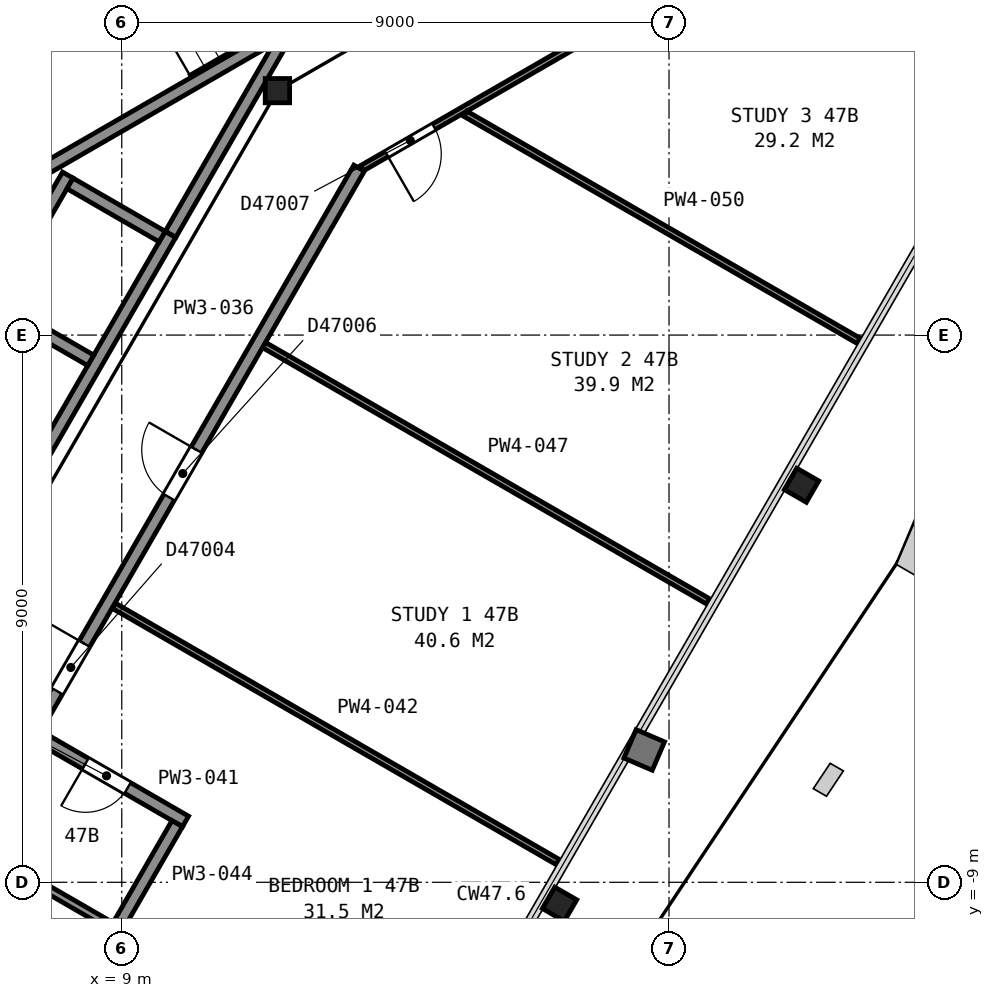
"""IFC4 building model, lengths in metres.
Left out: names, types, materials, properties, quantities, classifications, styles, units other than length and angle.
Written with IfcOpenShell. Run it as: python <this file> out.ifc"""

import sys

from ifc_helpers import new_model, si_unit, direction, frame, frame_2d, origin, origin_2d, place, context, subcontext, project, spatial, rectangle, i_section, extrude, element, fill, save


model = new_model("IFC4")
c1 = context("Model", 3, precision=1e-05, world=origin(), true_north=direction((0.0, 1.0)))
c2 = subcontext(c1, "Body", "Model", "MODEL_VIEW")
j1 = project(units=[si_unit("LENGTHUNIT", "METRE"), si_unit("PLANEANGLEUNIT", "RADIAN")], contexts=[c1])
p1 = place(None, origin())
s1 = spatial("IfcSite", under=j1, at=p1, CompositionType="ELEMENT")
p2 = place(p1, origin())
s2 = spatial("IfcBuilding", under=s1, at=p2, CompositionType="ELEMENT")
p3 = place(p2, frame((0.0, 0.0, 189.5)))
s3 = spatial("IfcBuildingStorey", under=s2, at=p3, CompositionType="ELEMENT", Elevation=189.5)
p4 = place(p3, frame((16.2, -9.36, 0.03), z_axis=(0.0, 0.0, 1.0), x_axis=(-0.5, -0.866025403784, 0.0)))
e1 = element("IfcColumn", 1, at=p4, inside=s3, PredefinedType="COLUMN", context=c2, shape_type="SweptSolid", body=[
    extrude(i_section(OverallWidth=0.406, OverallDepth=0.417, WebThickness=0.03, FlangeThickness=0.048, FilletRadius=0.015, at=origin_2d()), origin(), (0.0, 0.0, 1.0), 3.67),
])
p5 = place(p3, frame((20.18, -2.47, 0.035), z_axis=(0.0, 0.0, 1.0), x_axis=(-0.5, -0.866025403784, 0.0)))
e2 = element("IfcColumn", 2, at=p5, inside=s3, PredefinedType="COLUMN", context=c2, shape_type="SweptSolid", body=[
    extrude(i_section(OverallWidth=0.406, OverallDepth=0.417, WebThickness=0.03, FlangeThickness=0.048, FilletRadius=0.015, at=origin_2d()), origin(), (0.0, 0.0, 1.0), 3.665),
])
p6 = place(p3, frame((11.56, 4.02, 0.0), z_axis=(0.0, 0.0, 1.0), x_axis=(1.0, 0.0, 0.0)))
e3 = element("IfcColumn", 3, at=p6, inside=s3, PredefinedType="COLUMN", context=c2, shape_type="SweptSolid", body=[
    extrude(i_section(OverallWidth=0.401, OverallDepth=0.399, WebThickness=0.025, FlangeThickness=0.04, FilletRadius=0.015, at=origin_2d()), origin(), (0.0, 0.0, 1.0), 3.7),
])
p7 = place(p3, frame((7.678, 2.701, 0.0), z_axis=(0.0, 0.0, 1.0), x_axis=(0.866019993635, 0.500009370536, 0.0)))
e4 = element("IfcWall", 4, at=p7, inside=s3, PredefinedType="PARTITIONING", context=c2, shape_type="SweptSolid", body=[
    extrude(rectangle(XDim=9.6, YDim=0.2, at=frame_2d((4.8, 0.0))), origin(), (0.0, 0.0, 1.0), 3.45),
])
p8 = place(p3, frame((7.351, -2.587, 0.0), z_axis=(0.0, 0.0, 1.0), x_axis=(0.500002801628, 0.866023786258, 0.0)))
e5 = element("IfcWall", 5, at=p8, inside=s3, PredefinedType="PARTITIONING", context=c2, shape_type="SweptSolid", body=[
    extrude(rectangle(XDim=4.9, YDim=0.2, at=frame_2d((2.45, 0.0))), origin(), (0.0, 0.0, 1.0), 3.7),
])
p9 = place(p3, frame((5.663, -1.612, 0.0), z_axis=(0.0, 0.0, 1.0), x_axis=(0.49998122708, 0.866036242063, 0.0)))
e6 = element("IfcWall", 6, at=p9, inside=s3, PredefinedType="PARTITIONING", context=c2, shape_type="SweptSolid", body=[
    extrude(rectangle(XDim=4.9, YDim=0.2, at=frame_2d((2.45, 0.0))), origin(), (0.0, 0.0, 1.0), 3.7),
])
p10 = place(p3, frame((9.665, 1.62, 0.0), z_axis=(0.0, 0.0, 1.0), x_axis=(-0.866002029911, 0.500040482552, 0.0)))
e7 = element("IfcWall", 7, at=p10, inside=s3, PredefinedType="PARTITIONING", context=c2, shape_type="SweptSolid", body=[
    extrude(rectangle(XDim=1.75, YDim=0.2, at=frame_2d((0.875, 0.0))), origin(), (0.0, 0.0, 1.0), 3.7),
])
p11 = place(p3, frame((8.49, -0.416, 0.0), z_axis=(0.0, 0.0, 1.0), x_axis=(-0.866036909293, 0.499980071345, 0.0)))
e8 = element("IfcWall", 8, at=p11, inside=s3, PredefinedType="PARTITIONING", context=c2, shape_type="SweptSolid", body=[
    extrude(rectangle(XDim=1.75, YDim=0.2, at=frame_2d((0.875, 0.0))), origin(), (0.0, 0.0, 1.0), 3.7),
])
p12 = place(p3, frame((9.803, 1.658, 0.0), z_axis=(0.0, 0.0, 1.0), x_axis=(0.499943114462, 0.866058244174, 0.0)))
e9 = element("IfcWall", 9, at=p12, inside=s3, PredefinedType="PARTITIONING", context=c2, shape_type="SweptSolid", body=[
    extrude(rectangle(XDim=3.576, YDim=0.2, at=frame_2d((1.788, 0.0))), origin(), (0.0, 0.0, 1.0), 3.45),
])
p13 = place(p3, frame((12.903, 2.745, 0.0), z_axis=(0.0, 0.0, 1.0), x_axis=(-0.499992063946, -0.866029985619, 0.0)))
e10 = element("IfcWall", 10, at=p13, inside=s3, PredefinedType="PARTITIONING", context=c2, shape_type="SweptSolid", body=[
    extrude(rectangle(XDim=12.907, YDim=0.2, at=frame_2d((6.454, 0.0))), origin(), (0.0, 0.0, 1.0), 2.713),
])
p14 = place(p13, frame((9.032, 0.0, 0.0)))
e11 = element("IfcOpeningElement", 11, at=p14, cuts=e10, PredefinedType="OPENING", context=c2, shape_type="SweptSolid", body=[
    extrude(rectangle(XDim=0.9, YDim=2.1, at=frame_2d((0.45, 1.05))), frame((0.0, 0.11, 0.0), z_axis=(0.0, -1.0, 0.0), x_axis=(1.0, 0.0, 0.0)), (0.0, 0.0, 1.0), 0.22),
])
p15 = place(p13, frame((5.349, 0.0, 0.0)))
e12 = element("IfcOpeningElement", 12, at=p15, cuts=e10, PredefinedType="OPENING", context=c2, shape_type="SweptSolid", body=[
    extrude(rectangle(XDim=0.9, YDim=2.1, at=frame_2d((0.45, 1.05))), frame((0.0, 0.11, 0.0), z_axis=(0.0, -1.0, 0.0), x_axis=(1.0, 0.0, 0.0)), (0.0, 0.0, 1.0), 0.22),
])
p16 = place(p3, frame((6.576, -8.419, 0.0), z_axis=(0.0, 0.0, 1.0), x_axis=(0.866048155274, -0.499960591193, 0.0)))
e13 = element("IfcWall", 13, at=p16, inside=s3, PredefinedType="PARTITIONING", context=c2, shape_type="SweptSolid", body=[
    extrude(rectangle(XDim=8.431, YDim=0.125, at=frame_2d((4.215, 0.0))), origin(), (0.0, 0.0, 1.0), 2.713),
])
p17 = place(p3, frame((10.049, -7.999, 0.0), z_axis=(0.0, 0.0, 1.0), x_axis=(-0.866041588165, 0.499971966783, 0.0)))
e14 = element("IfcWall", 14, at=p17, inside=s3, PredefinedType="PARTITIONING", context=c2, shape_type="SweptSolid", body=[
    extrude(rectangle(XDim=2.795, YDim=0.2, at=frame_2d((1.397, 0.0))), origin(), (0.0, 0.0, 1.0), 2.713),
])
p18 = place(p17, frame((1.1, 0.0, 0.0)))
e15 = element("IfcOpeningElement", 15, at=p18, cuts=e14, PredefinedType="OPENING", context=c2, shape_type="SweptSolid", body=[
    extrude(rectangle(XDim=0.8, YDim=2.1, at=frame_2d((0.4, 1.05))), frame((0.0, 0.11, 0.0), z_axis=(0.0, -1.0, 0.0), x_axis=(1.0, 0.0, 0.0)), (0.0, 0.0, 1.0), 0.22),
])
p19 = place(p3, frame((8.869, -4.451, 0.0), z_axis=(0.0, 0.0, 1.0), x_axis=(0.866027858276, -0.499995748672, 0.0)))
e16 = element("IfcWall", 16, at=p19, inside=s3, PredefinedType="PARTITIONING", context=c2, shape_type="SweptSolid", body=[
    extrude(rectangle(XDim=8.429, YDim=0.1, at=frame_2d((4.214, 0.0))), origin(), (0.0, 0.0, 1.0), 2.713),
])
p20 = place(p3, frame((8.946, -9.709, 0.0), z_axis=(0.0, 0.0, 1.0), x_axis=(0.499970304126, 0.866042548026, 0.0)))
e17 = element("IfcWall", 17, at=p20, inside=s3, PredefinedType="PARTITIONING", context=c2, shape_type="SweptSolid", body=[
    extrude(rectangle(XDim=1.933, YDim=0.2, at=frame_2d((0.966, 0.0))), origin(), (0.0, 0.0, 1.0), 2.713),
])
p21 = place(p3, frame((11.343, -0.166, 0.0), z_axis=(0.0, 0.0, 1.0), x_axis=(0.866022557401, -0.500004930048, 0.0)))
e18 = element("IfcWall", 18, at=p21, inside=s3, PredefinedType="PARTITIONING", context=c2, shape_type="SweptSolid", body=[
    extrude(rectangle(XDim=8.429, YDim=0.1, at=frame_2d((4.215, 0.0))), origin(), (0.0, 0.0, 1.0), 2.713),
])
p22 = place(p3, frame((20.023, 6.826, 0.0), z_axis=(0.0, 0.0, 1.0), x_axis=(-0.86608949446, -0.499888975259, 0.0)))
e19 = element("IfcWall", 19, at=p22, inside=s3, PredefinedType="PARTITIONING", context=c2, shape_type="SweptSolid", body=[
    extrude(rectangle(XDim=8.165, YDim=0.1, at=frame_2d((4.083, 0.0))), origin(), (0.0, 0.0, 1.0), 2.713),
])
p23 = place(p22, frame((6.8, 0.0, 0.0)))
e20 = element("IfcOpeningElement", 20, at=p23, cuts=e19, PredefinedType="OPENING", context=c2, shape_type="SweptSolid", body=[
    extrude(rectangle(XDim=0.9, YDim=2.1, at=frame_2d((0.45, 1.05))), frame((0.0, 0.06, 0.0), z_axis=(0.0, -1.0, 0.0), x_axis=(1.0, 0.0, 0.0)), (0.0, 0.0, 1.0), 0.12),
])
p24 = place(p22, frame((2.989, 0.0, 0.0)))
e21 = element("IfcOpeningElement", 21, at=p24, cuts=e19, PredefinedType="OPENING", context=c2, shape_type="SweptSolid", body=[
    extrude(rectangle(XDim=0.9, YDim=2.1, at=frame_2d((0.45, 1.05))), frame((0.0, 0.06, 0.0), z_axis=(0.0, -1.0, 0.0), x_axis=(1.0, 0.0, 0.0)), (0.0, 0.0, 1.0), 0.12),
])
p25 = place(p3, frame((14.651, 3.64, 0.0), z_axis=(0.0, 0.0, 1.0), x_axis=(0.866021145342, -0.500007375767, 0.0)))
e22 = element("IfcWall", 22, at=p25, inside=s3, PredefinedType="PARTITIONING", context=c2, shape_type="SweptSolid", body=[
    extrude(rectangle(XDim=7.467, YDim=0.1, at=frame_2d((3.733, 0.0))), origin(), (0.0, 0.0, 1.0), 2.713),
])
p26 = place(p3, frame((19.601, 6.496, 0.0), z_axis=(0.0, 0.0, 1.0), x_axis=(0.866056775574, -0.499945658529, 0.0)))
e23 = element("IfcWall", 23, at=p26, inside=s3, PredefinedType="PARTITIONING", context=c2, shape_type="SweptSolid", body=[
    extrude(rectangle(XDim=4.608, YDim=0.1, at=frame_2d((2.304, 0.0))), origin(), (0.0, 0.0, 1.0), 2.713),
])
p27 = place(p14, origin())
e24 = element("IfcDoor", 24, at=p27, inside=s3, OperationType="SINGLE_SWING_LEFT", PredefinedType="DOOR", context=c2, shape_type="SweptSolid", body=[
    extrude(rectangle(XDim=0.9, YDim=2.1, at=frame_2d((0.45, 1.05))), frame((0.0, 0.025, 0.0), z_axis=(0.0, -1.0, 0.0), x_axis=(1.0, 0.0, 0.0)), (0.0, 0.0, 1.0), 0.05),
])
fill(e11, e24)
p28 = place(p15, origin())
e25 = element("IfcDoor", 25, at=p28, inside=s3, OperationType="SINGLE_SWING_LEFT", PredefinedType="DOOR", context=c2, shape_type="SweptSolid", body=[
    extrude(rectangle(XDim=0.9, YDim=2.1, at=frame_2d((0.45, 1.05))), frame((0.0, 0.025, 0.0), z_axis=(0.0, -1.0, 0.0), x_axis=(1.0, 0.0, 0.0)), (0.0, 0.0, 1.0), 0.05),
])
fill(e12, e25)
p29 = place(p18, origin())
e26 = element("IfcDoor", 26, at=p29, inside=s3, OperationType="SINGLE_SWING_RIGHT", PredefinedType="DOOR", context=c2, shape_type="SweptSolid", body=[
    extrude(rectangle(XDim=0.8, YDim=2.1, at=frame_2d((0.4, 1.05))), frame((0.0, 0.025, 0.0), z_axis=(0.0, -1.0, 0.0), x_axis=(1.0, 0.0, 0.0)), (0.0, 0.0, 1.0), 0.05),
])
fill(e15, e26)
p30 = place(p23, origin())
e27 = element("IfcDoor", 27, at=p30, inside=s3, OperationType="SINGLE_SWING_RIGHT", PredefinedType="DOOR", context=c2, shape_type="SweptSolid", body=[
    extrude(rectangle(XDim=0.9, YDim=2.1, at=frame_2d((0.45, 1.05))), frame((0.0, 0.025, 0.0), z_axis=(0.0, -1.0, 0.0), x_axis=(1.0, 0.0, 0.0)), (0.0, 0.0, 1.0), 0.05),
])
fill(e20, e27)
save(model, sys.argv[1])
